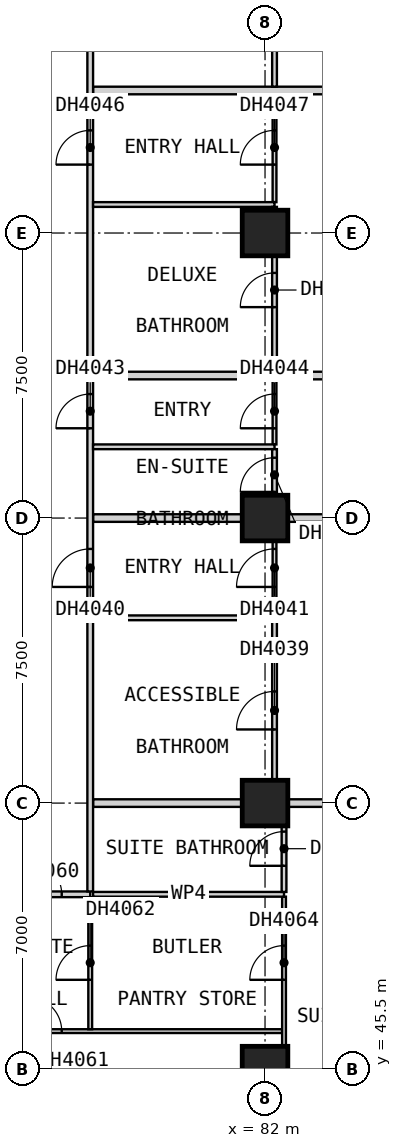
"""IFC4 building model, lengths in metres.
Left out: names, types, materials, properties, quantities, classifications, styles, units other than length and angle.
Written with IfcOpenShell. Run it as: python <this file> out.ifc"""

import sys

from ifc_helpers import new_model, si_unit, direction, frame, frame_2d, origin, origin_2d, place, context, subcontext, project, spatial, rectangle, extrude, element, fill, save


model = new_model("IFC4")
c1 = context("Model", 3, precision=1e-05, world=origin(), true_north=direction((0.0, 1.0)))
c2 = subcontext(c1, "Body", "Model", "MODEL_VIEW")
j1 = project(units=[si_unit("LENGTHUNIT", "METRE"), si_unit("PLANEANGLEUNIT", "RADIAN")], contexts=[c1])
p1 = place(None, origin())
s1 = spatial("IfcSite", under=j1, at=p1, CompositionType="ELEMENT")
p2 = place(p1, origin())
s2 = spatial("IfcBuilding", under=s1, at=p2, CompositionType="ELEMENT")
p3 = place(p2, frame((0.0, 0.0, 44.8)))
s3 = spatial("IfcBuildingStorey", under=s2, at=p3, CompositionType="ELEMENT", Elevation=44.8)
for number, where, z_axis, x_axis in (
    (1, (82.0, 45.5, 0.0), (0.0, 0.0, 1.0), (1.0, 0.0, 0.0)),
    (2, (82.0, 52.5, 0.0), (0.0, 0.0, 1.0), (1.0, 0.0, 0.0)),
    (3, (82.0, 60.0, 0.0), (0.0, 0.0, 1.0), (1.0, 0.0, 0.0)),
    (4, (82.0, 67.5, 0.0), (0.0, 0.0, 1.0), (1.0, 0.0, 0.0)),
):
    element("IfcColumn", number, at=place(p3, frame(where, z_axis=z_axis, x_axis=x_axis)), inside=s3, PredefinedType="COLUMN", context=c2, shape_type="SweptSolid", body=[
        extrude(rectangle(XDim=1.2, YDim=1.2, at=origin_2d()), origin(), (0.0, 0.0, 1.0), 3.6),
    ])
for number, where, z_axis, x_axis in (
    (5, (77.475, 52.5, 0.0), (0.0, 0.0, 1.0), (1.0, 0.0, 0.0)),
    (6, (77.475, 60.0, 0.0), (0.0, 0.0, 1.0), (1.0, 0.0, 0.0)),
):
    element("IfcWall", number, at=place(p3, frame(where, z_axis=z_axis, x_axis=x_axis)), inside=s3, PredefinedType="PARTITIONING", context=c2, shape_type="SweptSolid", body=[
        extrude(rectangle(XDim=12.525, YDim=0.2, at=frame_2d((6.262, 0.0))), origin(), (0.0, 0.0, 1.0), 3.35),
    ])
for number, where, z_axis, x_axis in (
    (7, (77.475, 63.75, 0.0), (0.0, 0.0, 1.0), (1.0, 0.0, 0.0)),
    (8, (77.475, 71.25, 0.0), (0.0, 0.0, 1.0), (1.0, 0.0, 0.0)),
):
    element("IfcWall", number, at=place(p3, frame(where, z_axis=z_axis, x_axis=x_axis)), inside=s3, PredefinedType="PARTITIONING", context=c2, shape_type="SweptSolid", body=[
        extrude(rectangle(XDim=11.715, YDim=0.2, at=frame_2d((5.857, 0.0))), origin(), (0.0, 0.0, 1.0), 3.35),
    ])
p4 = place(p3, frame((33.75, 50.1, 0.0), z_axis=(0.0, 0.0, 1.0), x_axis=(1.0, 0.0, 0.0)))
e9 = element("IfcWall", 9, at=p4, inside=s3, PredefinedType="PARTITIONING", context=c2, shape_type="SweptSolid", body=[
    extrude(rectangle(XDim=43.65, YDim=0.15, at=frame_2d((21.825, 0.0))), origin(), (0.0, 0.0, 1.0), 3.35),
])
p5 = place(p4, frame((5.175, 0.0, 0.0)))
e10 = element("IfcOpeningElement", 10, at=p5, cuts=e9, PredefinedType="OPENING", context=c2, shape_type="SweptSolid", body=[
    extrude(rectangle(XDim=0.9, YDim=2.1, at=frame_2d((0.45, 1.05))), frame((0.0, 0.085, 0.0), z_axis=(0.0, -1.0, 0.0), x_axis=(1.0, 0.0, 0.0)), (0.0, 0.0, 1.0), 0.17),
])
p6 = place(p4, frame((9.863, 0.0, 0.0)))
e11 = element("IfcOpeningElement", 11, at=p6, cuts=e9, PredefinedType="OPENING", context=c2, shape_type="SweptSolid", body=[
    extrude(rectangle(XDim=0.9, YDim=2.1, at=frame_2d((0.45, 1.05))), frame((0.0, 0.085, 0.0), z_axis=(0.0, -1.0, 0.0), x_axis=(1.0, 0.0, 0.0)), (0.0, 0.0, 1.0), 0.17),
])
p7 = place(p4, frame((16.938, 0.0, 0.0)))
e12 = element("IfcOpeningElement", 12, at=p7, cuts=e9, PredefinedType="OPENING", context=c2, shape_type="SweptSolid", body=[
    extrude(rectangle(XDim=1.0, YDim=2.1, at=frame_2d((0.5, 1.05))), frame((0.0, 0.085, 0.0), z_axis=(0.0, -1.0, 0.0), x_axis=(1.0, 0.0, 0.0)), (0.0, 0.0, 1.0), 0.17),
])
p8 = place(p4, frame((24.3, 0.0, 0.0)))
e13 = element("IfcOpeningElement", 13, at=p8, cuts=e9, PredefinedType="OPENING", context=c2, shape_type="SweptSolid", body=[
    extrude(rectangle(XDim=0.9, YDim=2.1, at=frame_2d((0.45, 1.05))), frame((0.0, 0.085, 0.0), z_axis=(0.0, -1.0, 0.0), x_axis=(1.0, 0.0, 0.0)), (0.0, 0.0, 1.0), 0.17),
])
p9 = place(p4, frame((31.938, 0.0, 0.0)))
e14 = element("IfcOpeningElement", 14, at=p9, cuts=e9, PredefinedType="OPENING", context=c2, shape_type="SweptSolid", body=[
    extrude(rectangle(XDim=1.0, YDim=2.1, at=frame_2d((0.5, 1.05))), frame((0.0, 0.085, 0.0), z_axis=(0.0, -1.0, 0.0), x_axis=(1.0, 0.0, 0.0)), (0.0, 0.0, 1.0), 0.17),
])
p10 = place(p4, frame((39.3, 0.0, 0.0)))
e15 = element("IfcOpeningElement", 15, at=p10, cuts=e9, PredefinedType="OPENING", context=c2, shape_type="SweptSolid", body=[
    extrude(rectangle(XDim=0.9, YDim=2.1, at=frame_2d((0.45, 1.05))), frame((0.0, 0.085, 0.0), z_axis=(0.0, -1.0, 0.0), x_axis=(1.0, 0.0, 0.0)), (0.0, 0.0, 1.0), 0.17),
])
p11 = place(p4, frame((42.0, 0.0, 0.0)))
e16 = element("IfcOpeningElement", 16, at=p11, cuts=e9, PredefinedType="OPENING", context=c2, shape_type="SweptSolid", body=[
    extrude(rectangle(XDim=0.9, YDim=2.1, at=frame_2d((0.45, 1.05))), frame((0.0, 0.085, 0.0), z_axis=(0.0, -1.0, 0.0), x_axis=(1.0, 0.0, 0.0)), (0.0, 0.0, 1.0), 0.17),
])
p12 = place(p3, frame((77.4, 50.175, 0.0), z_axis=(0.0, 0.0, 1.0), x_axis=(0.0, 1.0, 0.0)))
e17 = element("IfcWall", 17, at=p12, inside=s3, PredefinedType="PARTITIONING", context=c2, shape_type="SweptSolid", body=[
    extrude(rectangle(XDim=42.15, YDim=0.15, at=frame_2d((21.075, 0.0))), origin(), (0.0, 0.0, 1.0), 3.35),
])
p13 = place(p12, frame((8.012, 0.0, 0.0)))
e18 = element("IfcOpeningElement", 18, at=p13, cuts=e17, PredefinedType="OPENING", context=c2, shape_type="SweptSolid", body=[
    extrude(rectangle(XDim=1.0, YDim=2.1, at=frame_2d((0.5, 1.05))), frame((0.0, 0.085, 0.0), z_axis=(0.0, -1.0, 0.0), x_axis=(1.0, 0.0, 0.0)), (0.0, 0.0, 1.0), 0.17),
])
p14 = place(p12, frame((12.188, 0.0, 0.0)))
e19 = element("IfcOpeningElement", 19, at=p14, cuts=e17, PredefinedType="OPENING", context=c2, shape_type="SweptSolid", body=[
    extrude(rectangle(XDim=0.9, YDim=2.1, at=frame_2d((0.45, 1.05))), frame((0.0, 0.085, 0.0), z_axis=(0.0, -1.0, 0.0), x_axis=(1.0, 0.0, 0.0)), (0.0, 0.0, 1.0), 0.17),
])
p15 = place(p12, frame((19.125, 0.0, 0.0)))
e20 = element("IfcOpeningElement", 20, at=p15, cuts=e17, PredefinedType="OPENING", context=c2, shape_type="SweptSolid", body=[
    extrude(rectangle(XDim=0.9, YDim=2.1, at=frame_2d((0.45, 1.05))), frame((0.0, 0.085, 0.0), z_axis=(0.0, -1.0, 0.0), x_axis=(1.0, 0.0, 0.0)), (0.0, 0.0, 1.0), 0.17),
])
p16 = place(p12, frame((26.625, 0.0, 0.0)))
e21 = element("IfcOpeningElement", 21, at=p16, cuts=e17, PredefinedType="OPENING", context=c2, shape_type="SweptSolid", body=[
    extrude(rectangle(XDim=0.9, YDim=2.1, at=frame_2d((0.45, 1.05))), frame((0.0, 0.085, 0.0), z_axis=(0.0, -1.0, 0.0), x_axis=(1.0, 0.0, 0.0)), (0.0, 0.0, 1.0), 0.17),
])
p17 = place(p12, frame((30.938, 0.0, 0.0)))
e22 = element("IfcOpeningElement", 22, at=p17, cuts=e17, PredefinedType="OPENING", context=c2, shape_type="SweptSolid", body=[
    extrude(rectangle(XDim=0.9, YDim=2.1, at=frame_2d((0.45, 1.05))), frame((0.0, 0.085, 0.0), z_axis=(0.0, -1.0, 0.0), x_axis=(1.0, 0.0, 0.0)), (0.0, 0.0, 1.0), 0.17),
])
p18 = place(p12, frame((34.688, 0.0, 0.0)))
e23 = element("IfcOpeningElement", 23, at=p18, cuts=e17, PredefinedType="OPENING", context=c2, shape_type="SweptSolid", body=[
    extrude(rectangle(XDim=0.9, YDim=2.1, at=frame_2d((0.45, 1.05))), frame((0.0, 0.085, 0.0), z_axis=(0.0, -1.0, 0.0), x_axis=(1.0, 0.0, 0.0)), (0.0, 0.0, 1.0), 0.17),
])
p19 = place(p12, frame((38.438, 0.0, 0.0)))
e24 = element("IfcOpeningElement", 24, at=p19, cuts=e17, PredefinedType="OPENING", context=c2, shape_type="SweptSolid", body=[
    extrude(rectangle(XDim=0.9, YDim=2.1, at=frame_2d((0.45, 1.05))), frame((0.0, 0.085, 0.0), z_axis=(0.0, -1.0, 0.0), x_axis=(1.0, 0.0, 0.0)), (0.0, 0.0, 1.0), 0.17),
])
p20 = place(p3, frame((75.1, 46.5, 0.0), z_axis=(0.0, 0.0, 1.0), x_axis=(1.0, 0.0, 0.0)))
e25 = element("IfcWall", 25, at=p20, inside=s3, PredefinedType="PARTITIONING", context=c2, shape_type="SweptSolid", body=[
    extrude(rectangle(XDim=7.35, YDim=0.1, at=frame_2d((3.675, 0.0))), origin(), (0.0, 0.0, 1.0), 3.35),
])
p21 = place(p20, frame((0.65, 0.0, 0.0)))
e26 = element("IfcOpeningElement", 26, at=p21, cuts=e25, PredefinedType="OPENING", context=c2, shape_type="SweptSolid", body=[
    extrude(rectangle(XDim=0.9, YDim=2.1, at=frame_2d((0.45, 1.05))), frame((0.0, 0.06, 0.0), z_axis=(0.0, -1.0, 0.0), x_axis=(1.0, 0.0, 0.0)), (0.0, 0.0, 1.0), 0.12),
])
p22 = place(p3, frame((77.4, 46.55, 0.0), z_axis=(0.0, 0.0, 1.0), x_axis=(0.0, 1.0, 0.0)))
e27 = element("IfcWall", 27, at=p22, inside=s3, PredefinedType="PARTITIONING", context=c2, shape_type="SweptSolid", body=[
    extrude(rectangle(XDim=3.475, YDim=0.1, at=frame_2d((1.737, 0.0))), origin(), (0.0, 0.0, 1.0), 3.35),
])
p23 = place(p22, frame((1.3, 0.0, 0.0)))
e28 = element("IfcOpeningElement", 28, at=p23, cuts=e27, PredefinedType="OPENING", context=c2, shape_type="SweptSolid", body=[
    extrude(rectangle(XDim=0.9, YDim=2.1, at=frame_2d((0.45, 1.05))), frame((0.0, 0.06, 0.0), z_axis=(0.0, -1.0, 0.0), x_axis=(1.0, 0.0, 0.0)), (0.0, 0.0, 1.0), 0.12),
])
p24 = place(p3, frame((82.25, 57.438, 0.0), z_axis=(0.0, 0.0, 1.0), x_axis=(0.0, 1.0, 0.0)))
e29 = element("IfcWall", 29, at=p24, inside=s3, PredefinedType="PARTITIONING", context=c2, shape_type="SweptSolid", body=[
    extrude(rectangle(XDim=2.462, YDim=0.1, at=frame_2d((1.231, 0.0))), origin(), (0.0, 0.0, 1.0), 3.35),
])
p25 = place(p24, frame((0.75, 0.0, 0.0)))
e30 = element("IfcOpeningElement", 30, at=p25, cuts=e29, PredefinedType="OPENING", context=c2, shape_type="SweptSolid", body=[
    extrude(rectangle(XDim=1.0, YDim=2.1, at=frame_2d((0.5, 1.05))), frame((0.0, 0.06, 0.0), z_axis=(0.0, -1.0, 0.0), x_axis=(1.0, 0.0, 0.0)), (0.0, 0.0, 1.0), 0.12),
])
p26 = place(p3, frame((82.25, 61.938, 0.0), z_axis=(0.0, 0.0, 1.0), x_axis=(0.0, 1.0, 0.0)))
e31 = element("IfcWall", 31, at=p26, inside=s3, PredefinedType="PARTITIONING", context=c2, shape_type="SweptSolid", body=[
    extrude(rectangle(XDim=1.712, YDim=0.1, at=frame_2d((0.856, 0.0))), origin(), (0.0, 0.0, 1.0), 3.35),
])
p27 = place(p26, frame((0.425, 0.0, 0.0)))
e32 = element("IfcOpeningElement", 32, at=p27, cuts=e31, PredefinedType="OPENING", context=c2, shape_type="SweptSolid", body=[
    extrude(rectangle(XDim=0.9, YDim=2.1, at=frame_2d((0.45, 1.05))), frame((0.0, 0.06, 0.0), z_axis=(0.0, -1.0, 0.0), x_axis=(1.0, 0.0, 0.0)), (0.0, 0.0, 1.0), 0.12),
])
p28 = place(p3, frame((82.25, 68.312, 0.0), z_axis=(0.0, 0.0, 1.0), x_axis=(0.0, 1.0, 0.0)))
e33 = element("IfcWall", 33, at=p28, inside=s3, PredefinedType="PARTITIONING", context=c2, shape_type="SweptSolid", body=[
    extrude(rectangle(XDim=2.837, YDim=0.1, at=frame_2d((1.419, 0.0))), origin(), (0.0, 0.0, 1.0), 3.35),
])
p29 = place(p28, frame((0.988, 0.0, 0.0)))
e34 = element("IfcOpeningElement", 34, at=p29, cuts=e33, PredefinedType="OPENING", context=c2, shape_type="SweptSolid", body=[
    extrude(rectangle(XDim=0.9, YDim=2.1, at=frame_2d((0.45, 1.05))), frame((0.0, 0.06, 0.0), z_axis=(0.0, -1.0, 0.0), x_axis=(1.0, 0.0, 0.0)), (0.0, 0.0, 1.0), 0.12),
])
p30 = place(p3, frame((82.5, 38.31, 0.0), z_axis=(0.0, 0.0, 1.0), x_axis=(0.0, 1.0, 0.0)))
e35 = element("IfcWall", 35, at=p30, inside=s3, PredefinedType="PARTITIONING", context=c2, shape_type="SweptSolid", body=[
    extrude(rectangle(XDim=11.728, YDim=0.1, at=frame_2d((5.864, 0.0))), origin(), (0.0, 0.0, 1.0), 3.35),
])
p31 = place(p30, frame((0.615, 0.0, 0.0)))
e36 = element("IfcOpeningElement", 36, at=p31, cuts=e35, PredefinedType="OPENING", context=c2, shape_type="SweptSolid", body=[
    extrude(rectangle(XDim=0.9, YDim=2.1, at=frame_2d((0.45, 1.05))), frame((0.0, 0.06, 0.0), z_axis=(0.0, -1.0, 0.0), x_axis=(1.0, 0.0, 0.0)), (0.0, 0.0, 1.0), 0.12),
])
p32 = place(p30, frame((9.54, 0.0, 0.0)))
e37 = element("IfcOpeningElement", 37, at=p32, cuts=e35, PredefinedType="OPENING", context=c2, shape_type="SweptSolid", body=[
    extrude(rectangle(XDim=0.9, YDim=2.1, at=frame_2d((0.45, 1.05))), frame((0.0, 0.06, 0.0), z_axis=(0.0, -1.0, 0.0), x_axis=(1.0, 0.0, 0.0)), (0.0, 0.0, 1.0), 0.12),
])
p33 = place(p3, frame((77.475, 50.1, 0.0), z_axis=(0.0, 0.0, 1.0), x_axis=(1.0, 0.0, 0.0)))
e38 = element("IfcWall", 38, at=p33, inside=s3, PredefinedType="PARTITIONING", context=c2, shape_type="SweptSolid", body=[
    extrude(rectangle(XDim=5.025, YDim=0.125, at=frame_2d((2.512, 0.0))), origin(), (0.0, 0.0, 1.0), 3.35),
])
for number, where, z_axis, x_axis in (
    (39, (77.475, 57.375, 0.0), (0.0, 0.0, 1.0), (1.0, 0.0, 0.0)),
    (40, (77.475, 61.875, 0.0), (0.0, 0.0, 1.0), (1.0, 0.0, 0.0)),
    (41, (77.475, 68.25, 0.0), (0.0, 0.0, 1.0), (1.0, 0.0, 0.0)),
):
    element("IfcWall", number, at=place(p3, frame(where, z_axis=z_axis, x_axis=x_axis)), inside=s3, PredefinedType="PARTITIONING", context=c2, shape_type="SweptSolid", body=[
        extrude(rectangle(XDim=4.775, YDim=0.125, at=frame_2d((2.387, 0.0))), origin(), (0.0, 0.0, 1.0), 3.35),
    ])
p34 = place(p3, frame((82.25, 52.6, 0.0), z_axis=(0.0, 0.0, 1.0), x_axis=(0.0, 1.0, 0.0)))
e42 = element("IfcWall", 42, at=p34, inside=s3, PredefinedType="PARTITIONING", context=c2, shape_type="SweptSolid", body=[
    extrude(rectangle(XDim=4.712, YDim=0.125, at=frame_2d((2.356, 0.0))), origin(), (0.0, 0.0, 1.0), 3.35),
])
p35 = place(p34, frame((1.837, 0.0, 0.0)))
e43 = element("IfcOpeningElement", 43, at=p35, cuts=e42, PredefinedType="OPENING", context=c2, shape_type="SweptSolid", body=[
    extrude(rectangle(XDim=1.0, YDim=2.1, at=frame_2d((0.5, 1.05))), frame((0.0, 0.073, 0.0), z_axis=(0.0, -1.0, 0.0), x_axis=(1.0, 0.0, 0.0)), (0.0, 0.0, 1.0), 0.145),
])
p36 = place(p3, frame((82.25, 60.1, 0.0), z_axis=(0.0, 0.0, 1.0), x_axis=(0.0, 1.0, 0.0)))
e44 = element("IfcWall", 44, at=p36, inside=s3, PredefinedType="PARTITIONING", context=c2, shape_type="SweptSolid", body=[
    extrude(rectangle(XDim=1.712, YDim=0.125, at=frame_2d((0.856, 0.0))), origin(), (0.0, 0.0, 1.0), 3.35),
])
p37 = place(p36, frame((0.587, 0.0, 0.0)))
e45 = element("IfcOpeningElement", 45, at=p37, cuts=e44, PredefinedType="OPENING", context=c2, shape_type="SweptSolid", body=[
    extrude(rectangle(XDim=0.9, YDim=2.1, at=frame_2d((0.45, 1.05))), frame((0.0, 0.073, 0.0), z_axis=(0.0, -1.0, 0.0), x_axis=(1.0, 0.0, 0.0)), (0.0, 0.0, 1.0), 0.145),
])
p38 = place(p3, frame((82.25, 63.85, 0.0), z_axis=(0.0, 0.0, 1.0), x_axis=(0.0, 1.0, 0.0)))
e46 = element("IfcWall", 46, at=p38, inside=s3, PredefinedType="PARTITIONING", context=c2, shape_type="SweptSolid", body=[
    extrude(rectangle(XDim=4.337, YDim=0.125, at=frame_2d((2.169, 0.0))), origin(), (0.0, 0.0, 1.0), 3.35),
])
p39 = place(p38, frame((1.7, 0.0, 0.0)))
e47 = element("IfcOpeningElement", 47, at=p39, cuts=e46, PredefinedType="OPENING", context=c2, shape_type="SweptSolid", body=[
    extrude(rectangle(XDim=0.9, YDim=2.1, at=frame_2d((0.45, 1.05))), frame((0.0, 0.073, 0.0), z_axis=(0.0, -1.0, 0.0), x_axis=(1.0, 0.0, 0.0)), (0.0, 0.0, 1.0), 0.145),
])
p40 = place(p3, frame((82.25, 71.35, 0.0), z_axis=(0.0, 0.0, 1.0), x_axis=(0.0, 1.0, 0.0)))
e48 = element("IfcWall", 48, at=p40, inside=s3, PredefinedType="PARTITIONING", context=c2, shape_type="SweptSolid", body=[
    extrude(rectangle(XDim=4.337, YDim=0.125, at=frame_2d((2.169, 0.0))), origin(), (0.0, 0.0, 1.0), 3.35),
])
p41 = place(p40, frame((1.7, 0.0, 0.0)))
e49 = element("IfcOpeningElement", 49, at=p41, cuts=e48, PredefinedType="OPENING", context=c2, shape_type="SweptSolid", body=[
    extrude(rectangle(XDim=0.9, YDim=2.1, at=frame_2d((0.45, 1.05))), frame((0.0, 0.073, 0.0), z_axis=(0.0, -1.0, 0.0), x_axis=(1.0, 0.0, 0.0)), (0.0, 0.0, 1.0), 0.145),
])
p42 = place(p3, frame((82.5, 50.163, 0.0), z_axis=(0.0, 0.0, 1.0), x_axis=(0.0, 1.0, 0.0)))
e50 = element("IfcWall", 50, at=p42, inside=s3, PredefinedType="PARTITIONING", context=c2, shape_type="SweptSolid", body=[
    extrude(rectangle(XDim=2.237, YDim=0.125, at=frame_2d((1.119, 0.0))), origin(), (0.0, 0.0, 1.0), 3.35),
])
p43 = place(p42, frame((0.688, 0.0, 0.0)))
e51 = element("IfcOpeningElement", 51, at=p43, cuts=e50, PredefinedType="OPENING", context=c2, shape_type="SweptSolid", body=[
    extrude(rectangle(XDim=0.9, YDim=2.1, at=frame_2d((0.45, 1.05))), frame((0.0, 0.073, 0.0), z_axis=(0.0, -1.0, 0.0), x_axis=(1.0, 0.0, 0.0)), (0.0, 0.0, 1.0), 0.145),
])
p44 = place(p35, origin())
e52 = element("IfcDoor", 52, at=p44, inside=s3, OperationType="SINGLE_SWING_LEFT", PredefinedType="DOOR", context=c2, shape_type="SweptSolid", body=[
    extrude(rectangle(XDim=1.0, YDim=2.1, at=frame_2d((0.5, 1.05))), frame((0.0, 0.025, 0.0), z_axis=(0.0, -1.0, 0.0), x_axis=(1.0, 0.0, 0.0)), (0.0, 0.0, 1.0), 0.05),
])
fill(e43, e52)
p45 = place(p13, origin())
e53 = element("IfcDoor", 53, at=p45, inside=s3, OperationType="SINGLE_SWING_RIGHT", PredefinedType="DOOR", context=c2, shape_type="SweptSolid", body=[
    extrude(rectangle(XDim=1.0, YDim=2.1, at=frame_2d((0.5, 1.05))), frame((0.0, 0.025, 0.0), z_axis=(0.0, -1.0, 0.0), x_axis=(1.0, 0.0, 0.0)), (0.0, 0.0, 1.0), 0.05),
])
fill(e18, e53)
p46 = place(p25, origin())
e54 = element("IfcDoor", 54, at=p46, inside=s3, OperationType="SINGLE_SWING_LEFT", PredefinedType="DOOR", context=c2, shape_type="SweptSolid", body=[
    extrude(rectangle(XDim=1.0, YDim=2.1, at=frame_2d((0.5, 1.05))), frame((0.0, 0.025, 0.0), z_axis=(0.0, -1.0, 0.0), x_axis=(1.0, 0.0, 0.0)), (0.0, 0.0, 1.0), 0.05),
])
fill(e30, e54)
p47 = place(p37, origin())
e55 = element("IfcDoor", 55, at=p47, inside=s3, OperationType="SINGLE_SWING_RIGHT", PredefinedType="DOOR", context=c2, shape_type="SweptSolid", body=[
    extrude(rectangle(XDim=0.9, YDim=2.1, at=frame_2d((0.45, 1.05))), frame((0.0, 0.025, 0.0), z_axis=(0.0, -1.0, 0.0), x_axis=(1.0, 0.0, 0.0)), (0.0, 0.0, 1.0), 0.05),
])
fill(e45, e55)
p48 = place(p14, origin())
e56 = element("IfcDoor", 56, at=p48, inside=s3, OperationType="SINGLE_SWING_RIGHT", PredefinedType="DOOR", context=c2, shape_type="SweptSolid", body=[
    extrude(rectangle(XDim=0.9, YDim=2.1, at=frame_2d((0.45, 1.05))), frame((0.0, 0.025, 0.0), z_axis=(0.0, -1.0, 0.0), x_axis=(1.0, 0.0, 0.0)), (0.0, 0.0, 1.0), 0.05),
])
fill(e19, e56)
p49 = place(p27, origin())
e57 = element("IfcDoor", 57, at=p49, inside=s3, OperationType="SINGLE_SWING_LEFT", PredefinedType="DOOR", context=c2, shape_type="SweptSolid", body=[
    extrude(rectangle(XDim=0.9, YDim=2.1, at=frame_2d((0.45, 1.05))), frame((0.0, 0.025, 0.0), z_axis=(0.0, -1.0, 0.0), x_axis=(1.0, 0.0, 0.0)), (0.0, 0.0, 1.0), 0.05),
])
fill(e32, e57)
p50 = place(p39, origin())
e58 = element("IfcDoor", 58, at=p50, inside=s3, OperationType="SINGLE_SWING_LEFT", PredefinedType="DOOR", context=c2, shape_type="SweptSolid", body=[
    extrude(rectangle(XDim=0.9, YDim=2.1, at=frame_2d((0.45, 1.05))), frame((0.0, 0.025, 0.0), z_axis=(0.0, -1.0, 0.0), x_axis=(1.0, 0.0, 0.0)), (0.0, 0.0, 1.0), 0.05),
])
fill(e47, e58)
p51 = place(p15, origin())
e59 = element("IfcDoor", 59, at=p51, inside=s3, OperationType="SINGLE_SWING_RIGHT", PredefinedType="DOOR", context=c2, shape_type="SweptSolid", body=[
    extrude(rectangle(XDim=0.9, YDim=2.1, at=frame_2d((0.45, 1.05))), frame((0.0, 0.025, 0.0), z_axis=(0.0, -1.0, 0.0), x_axis=(1.0, 0.0, 0.0)), (0.0, 0.0, 1.0), 0.05),
])
fill(e20, e59)
p52 = place(p29, origin())
e60 = element("IfcDoor", 60, at=p52, inside=s3, OperationType="SINGLE_SWING_LEFT", PredefinedType="DOOR", context=c2, shape_type="SweptSolid", body=[
    extrude(rectangle(XDim=0.9, YDim=2.1, at=frame_2d((0.45, 1.05))), frame((0.0, 0.025, 0.0), z_axis=(0.0, -1.0, 0.0), x_axis=(1.0, 0.0, 0.0)), (0.0, 0.0, 1.0), 0.05),
])
fill(e34, e60)
p53 = place(p11, origin())
e61 = element("IfcDoor", 61, at=p53, inside=s3, OperationType="SINGLE_SWING_LEFT", PredefinedType="DOOR", context=c2, shape_type="SweptSolid", body=[
    extrude(rectangle(XDim=0.9, YDim=2.1, at=frame_2d((0.45, 1.05))), frame((0.0, 0.025, 0.0), z_axis=(0.0, -1.0, 0.0), x_axis=(1.0, 0.0, 0.0)), (0.0, 0.0, 1.0), 0.05),
])
fill(e16, e61)
p54 = place(p21, origin())
e62 = element("IfcDoor", 62, at=p54, inside=s3, OperationType="SINGLE_SWING_RIGHT", PredefinedType="DOOR", context=c2, shape_type="SweptSolid", body=[
    extrude(rectangle(XDim=0.9, YDim=2.1, at=frame_2d((0.45, 1.05))), frame((0.0, 0.025, 0.0), z_axis=(0.0, -1.0, 0.0), x_axis=(1.0, 0.0, 0.0)), (0.0, 0.0, 1.0), 0.05),
])
fill(e26, e62)
p55 = place(p23, origin())
e63 = element("IfcDoor", 63, at=p55, inside=s3, OperationType="SINGLE_SWING_RIGHT", PredefinedType="DOOR", context=c2, shape_type="SweptSolid", body=[
    extrude(rectangle(XDim=0.9, YDim=2.1, at=frame_2d((0.45, 1.05))), frame((0.0, 0.025, 0.0), z_axis=(0.0, -1.0, 0.0), x_axis=(1.0, 0.0, 0.0)), (0.0, 0.0, 1.0), 0.05),
])
fill(e28, e63)
p56 = place(p32, origin())
e64 = element("IfcDoor", 64, at=p56, inside=s3, OperationType="SINGLE_SWING_RIGHT", PredefinedType="DOOR", context=c2, shape_type="SweptSolid", body=[
    extrude(rectangle(XDim=0.9, YDim=2.1, at=frame_2d((0.45, 1.05))), frame((0.0, 0.025, 0.0), z_axis=(0.0, -1.0, 0.0), x_axis=(1.0, 0.0, 0.0)), (0.0, 0.0, 1.0), 0.05),
])
fill(e37, e64)
p57 = place(p43, origin())
e65 = element("IfcDoor", 65, at=p57, inside=s3, OperationType="SINGLE_SWING_LEFT", PredefinedType="DOOR", context=c2, shape_type="SweptSolid", body=[
    extrude(rectangle(XDim=0.9, YDim=2.1, at=frame_2d((0.45, 1.05))), frame((0.0, 0.025, 0.0), z_axis=(0.0, -1.0, 0.0), x_axis=(1.0, 0.0, 0.0)), (0.0, 0.0, 1.0), 0.05),
])
fill(e51, e65)
save(model, sys.argv[1])
